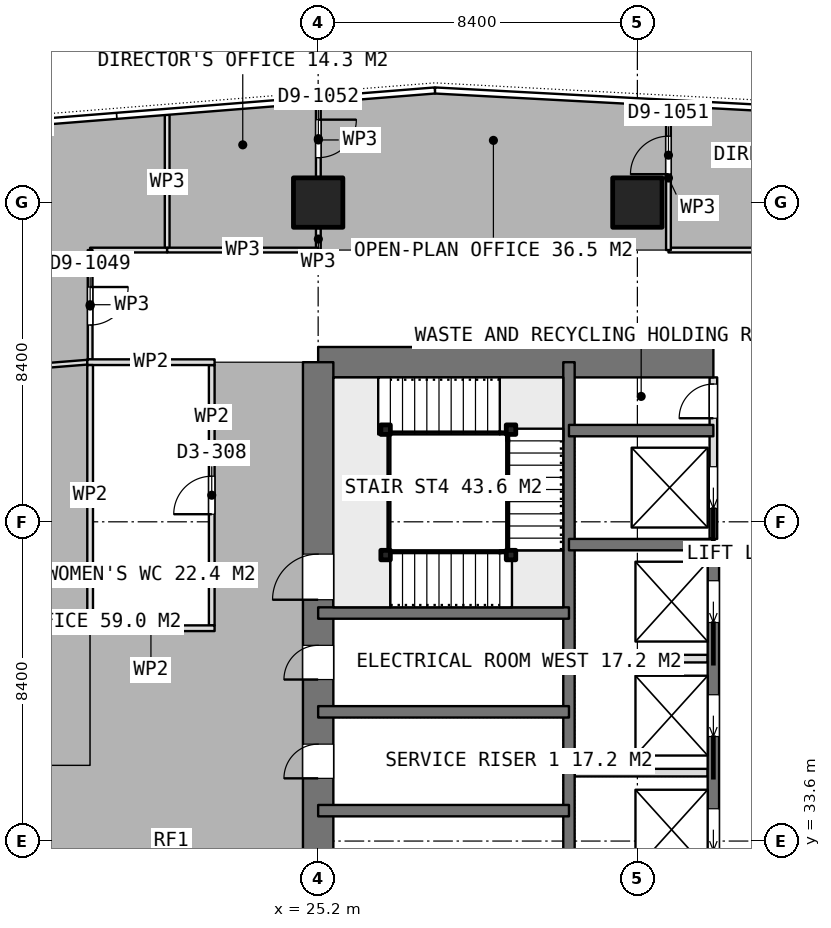
"""IFC4 building model, lengths in metres.
Left out: names, types, materials, properties, quantities, classifications, styles, units other than length and angle.
Written with IfcOpenShell. Run it as: python <this file> out.ifc"""

import sys

from ifc_helpers import new_model, si_unit, direction, frame, frame_2d, origin, origin_2d, place, context, subcontext, project, spatial, rectangle, extrude, element, fill, save


model = new_model("IFC4")
c1 = context("Model", 3, precision=1e-05, world=origin(), true_north=direction((0.0, 1.0)))
c2 = subcontext(c1, "Body", "Model", "MODEL_VIEW")
j1 = project(units=[si_unit("LENGTHUNIT", "METRE"), si_unit("PLANEANGLEUNIT", "RADIAN")], contexts=[c1])
p1 = place(None, origin())
s1 = spatial("IfcSite", under=j1, at=p1, CompositionType="ELEMENT")
p2 = place(p1, origin())
s2 = spatial("IfcBuilding", under=s1, at=p2, CompositionType="ELEMENT")
p3 = place(p2, frame((0.0, 0.0, 283.85)))
s3 = spatial("IfcBuildingStorey", under=s2, at=p3, CompositionType="ELEMENT", Elevation=283.85)
p4 = place(p3, frame((25.2, 46.2, 0.0), z_axis=(0.0, 0.0, 1.0), x_axis=(1.0, 0.0, 0.0)))
e1 = element("IfcWall", 1, at=p4, inside=s3, PredefinedType="SHEAR", context=c2, shape_type="SweptSolid", body=[
    extrude(rectangle(XDim=10.4, YDim=0.8, at=frame_2d((5.2, 0.0))), origin(), (0.0, 0.0, 1.0), 3.75),
])
p5 = place(p3, frame((25.2, 21.0, 0.0), z_axis=(0.0, 0.0, 1.0), x_axis=(0.0, 1.0, 0.0)))
e2 = element("IfcWall", 2, at=p5, inside=s3, PredefinedType="SHEAR", context=c2, shape_type="SweptSolid", body=[
    extrude(rectangle(XDim=25.2, YDim=0.8, at=frame_2d((12.6, 0.0))), origin(), (0.0, 0.0, 1.0), 3.75),
])
p6 = place(p5, frame((7.8, 0.0, 0.0)))
e3 = element("IfcOpeningElement", 3, at=p6, cuts=e2, PredefinedType="OPENING", context=c2, shape_type="SweptSolid", body=[
    extrude(rectangle(XDim=1.2, YDim=2.1, at=frame_2d((0.6, 1.05))), frame((0.0, 0.41, 0.0), z_axis=(0.0, -1.0, 0.0), x_axis=(1.0, 0.0, 0.0)), (0.0, 0.0, 1.0), 0.82),
])
p7 = place(p5, frame((14.25, 0.0, 0.0)))
e4 = element("IfcOpeningElement", 4, at=p7, cuts=e2, PredefinedType="OPENING", context=c2, shape_type="SweptSolid", body=[
    extrude(rectangle(XDim=0.9, YDim=2.1, at=frame_2d((0.45, 1.05))), frame((0.0, 0.41, 0.0), z_axis=(0.0, -1.0, 0.0), x_axis=(1.0, 0.0, 0.0)), (0.0, 0.0, 1.0), 0.82),
])
p8 = place(p5, frame((16.85, 0.0, 0.0)))
e5 = element("IfcOpeningElement", 5, at=p8, cuts=e2, PredefinedType="OPENING", context=c2, shape_type="SweptSolid", body=[
    extrude(rectangle(XDim=0.9, YDim=2.1, at=frame_2d((0.45, 1.05))), frame((0.0, 0.41, 0.0), z_axis=(0.0, -1.0, 0.0), x_axis=(1.0, 0.0, 0.0)), (0.0, 0.0, 1.0), 0.82),
])
p9 = place(p5, frame((18.95, 0.0, 0.0)))
e6 = element("IfcOpeningElement", 6, at=p9, cuts=e2, PredefinedType="OPENING", context=c2, shape_type="SweptSolid", body=[
    extrude(rectangle(XDim=1.2, YDim=2.1, at=frame_2d((0.6, 1.05))), frame((0.0, 0.41, 0.0), z_axis=(0.0, -1.0, 0.0), x_axis=(1.0, 0.0, 0.0)), (0.0, 0.0, 1.0), 0.82),
])
p10 = place(p3, frame((31.8, 21.0, 0.0), z_axis=(0.0, 0.0, 1.0), x_axis=(0.0, 1.0, 0.0)))
e7 = element("IfcWall", 7, at=p10, inside=s3, PredefinedType="SHEAR", context=c2, shape_type="SweptSolid", body=[
    extrude(rectangle(XDim=25.2, YDim=0.3, at=frame_2d((12.6, 0.0))), origin(), (0.0, 0.0, 1.0), 3.75),
])
p11 = place(p3, frame((35.6, 23.4, 0.0), z_axis=(0.0, 0.0, 1.0), x_axis=(0.0, 1.0, 0.0)))
e8 = element("IfcWall", 8, at=p11, inside=s3, PredefinedType="SHEAR", context=c2, shape_type="SweptSolid", body=[
    extrude(rectangle(XDim=18.0, YDim=0.3, at=frame_2d((9.0, 0.0))), origin(), (0.0, 0.0, 1.0), 3.75),
])
p12 = place(p11, frame((0.95, 0.0, 0.0)))
e9 = element("IfcOpeningElement", 9, at=p12, cuts=e8, PredefinedType="OPENING", context=c2, shape_type="SweptSolid", body=[
    extrude(rectangle(XDim=1.1, YDim=2.1, at=frame_2d((0.55, 1.05))), frame((0.0, 0.16, 0.0), z_axis=(0.0, -1.0, 0.0), x_axis=(1.0, 0.0, 0.0)), (0.0, 0.0, 1.0), 0.32),
])
p13 = place(p11, frame((3.95, 0.0, 0.0)))
e10 = element("IfcOpeningElement", 10, at=p13, cuts=e8, PredefinedType="OPENING", context=c2, shape_type="SweptSolid", body=[
    extrude(rectangle(XDim=1.1, YDim=2.1, at=frame_2d((0.55, 1.05))), frame((0.0, 0.16, 0.0), z_axis=(0.0, -1.0, 0.0), x_axis=(1.0, 0.0, 0.0)), (0.0, 0.0, 1.0), 0.32),
])
p14 = place(p11, frame((6.95, 0.0, 0.0)))
e11 = element("IfcOpeningElement", 11, at=p14, cuts=e8, PredefinedType="OPENING", context=c2, shape_type="SweptSolid", body=[
    extrude(rectangle(XDim=1.1, YDim=2.1, at=frame_2d((0.55, 1.05))), frame((0.0, 0.16, 0.0), z_axis=(0.0, -1.0, 0.0), x_axis=(1.0, 0.0, 0.0)), (0.0, 0.0, 1.0), 0.32),
])
p15 = place(p11, frame((9.95, 0.0, 0.0)))
e12 = element("IfcOpeningElement", 12, at=p15, cuts=e8, PredefinedType="OPENING", context=c2, shape_type="SweptSolid", body=[
    extrude(rectangle(XDim=1.1, YDim=2.1, at=frame_2d((0.55, 1.05))), frame((0.0, 0.16, 0.0), z_axis=(0.0, -1.0, 0.0), x_axis=(1.0, 0.0, 0.0)), (0.0, 0.0, 1.0), 0.32),
])
p16 = place(p11, frame((12.95, 0.0, 0.0)))
e13 = element("IfcOpeningElement", 13, at=p16, cuts=e8, PredefinedType="OPENING", context=c2, shape_type="SweptSolid", body=[
    extrude(rectangle(XDim=1.1, YDim=2.1, at=frame_2d((0.55, 1.05))), frame((0.0, 0.16, 0.0), z_axis=(0.0, -1.0, 0.0), x_axis=(1.0, 0.0, 0.0)), (0.0, 0.0, 1.0), 0.32),
])
p17 = place(p11, frame((15.95, 0.0, 0.0)))
e14 = element("IfcOpeningElement", 14, at=p17, cuts=e8, PredefinedType="OPENING", context=c2, shape_type="SweptSolid", body=[
    extrude(rectangle(XDim=1.1, YDim=2.1, at=frame_2d((0.55, 1.05))), frame((0.0, 0.16, 0.0), z_axis=(0.0, -1.0, 0.0), x_axis=(1.0, 0.0, 0.0)), (0.0, 0.0, 1.0), 0.32),
])
for number, where, z_axis, x_axis in (
    (15, (31.8, 41.4, 0.0), (0.0, 0.0, 1.0), (1.0, 0.0, 0.0)),
    (16, (31.8, 44.4, 0.0), (0.0, 0.0, 1.0), (1.0, 0.0, 0.0)),
):
    element("IfcWall", number, at=place(p3, frame(where, z_axis=z_axis, x_axis=x_axis)), inside=s3, PredefinedType="SHEAR", context=c2, shape_type="SweptSolid", body=[
        extrude(rectangle(XDim=3.8, YDim=0.3, at=frame_2d((1.9, 0.0))), origin(), (0.0, 0.0, 1.0), 3.75),
    ])
for number, where, z_axis, x_axis in (
    (17, (25.2, 34.4, 0.0), (0.0, 0.0, 1.0), (1.0, 0.0, 0.0)),
    (18, (25.2, 37.0, 0.0), (0.0, 0.0, 1.0), (1.0, 0.0, 0.0)),
    (19, (25.2, 39.6, 0.0), (0.0, 0.0, 1.0), (1.0, 0.0, 0.0)),
):
    element("IfcWall", number, at=place(p3, frame(where, z_axis=z_axis, x_axis=x_axis)), inside=s3, PredefinedType="SHEAR", context=c2, shape_type="SweptSolid", body=[
        extrude(rectangle(XDim=6.6, YDim=0.3, at=frame_2d((3.3, 0.0))), origin(), (0.0, 0.0, 1.0), 3.75),
    ])
for number, where, z_axis, x_axis in (
    (20, (25.2, 50.4, 0.0), (0.0, 0.0, 1.0), (1.0, 0.0, 0.0)),
    (21, (33.6, 50.4, 0.0), (0.0, 0.0, 1.0), (1.0, 0.0, 0.0)),
):
    element("IfcColumn", number, at=place(p3, frame(where, z_axis=z_axis, x_axis=x_axis)), inside=s3, PredefinedType="COLUMN", context=c2, shape_type="SweptSolid", body=[
        extrude(rectangle(XDim=1.3, YDim=1.3, at=origin_2d()), origin(), (0.0, 0.0, 1.0), 3.75),
    ])
for number, where, z_axis, x_axis in (
    (22, (31.95, 35.4, 0.0), (0.0, 0.0, 1.0), (1.0, 0.0, 0.0)),
    (23, (31.95, 38.4, 0.0), (0.0, 0.0, 1.0), (1.0, 0.0, 0.0)),
):
    element("IfcWall", number, at=place(p3, frame(where, z_axis=z_axis, x_axis=x_axis)), inside=s3, PredefinedType="PARTITIONING", context=c2, shape_type="SweptSolid", body=[
        extrude(rectangle(XDim=3.5, YDim=0.2, at=frame_2d((1.75, 0.0))), origin(), (0.0, 0.0, 1.0), 3.5),
    ])
p18 = place(p3, frame((35.6, 41.55, 0.0), z_axis=(0.0, 0.0, 1.0), x_axis=(0.0, 1.0, 0.0)))
e24 = element("IfcWall", 24, at=p18, inside=s3, PredefinedType="PARTITIONING", context=c2, shape_type="SweptSolid", body=[
    extrude(rectangle(XDim=4.25, YDim=0.2, at=frame_2d((2.125, 0.0))), origin(), (0.0, 0.0, 1.0), 3.5),
])
p19 = place(p18, frame((3.175, 0.0, 0.0)))
e25 = element("IfcOpeningElement", 25, at=p19, cuts=e24, PredefinedType="OPENING", context=c2, shape_type="SweptSolid", body=[
    extrude(rectangle(XDim=0.9, YDim=2.1, at=frame_2d((0.45, 1.05))), frame((0.0, 0.11, 0.0), z_axis=(0.0, -1.0, 0.0), x_axis=(1.0, 0.0, 0.0)), (0.0, 0.0, 1.0), 0.22),
])
p20 = place(p18, frame((0.8, 0.0, 0.0)))
e26 = element("IfcOpeningElement", 26, at=p20, cuts=e24, PredefinedType="OPENING", context=c2, shape_type="SweptSolid", body=[
    extrude(rectangle(XDim=1.1, YDim=2.1, at=frame_2d((0.55, 1.05))), frame((0.0, 0.11, 0.0), z_axis=(0.0, -1.0, 0.0), x_axis=(1.0, 0.0, 0.0)), (0.0, 0.0, 1.0), 0.22),
])
for number, where, z_axis, x_axis in (
    (27, (19.125, 39.2, 0.0), (0.0, 0.0, 1.0), (1.0, 0.0, 0.0)),
    (28, (19.125, 46.2, 0.0), (0.0, 0.0, 1.0), (1.0, 0.0, 0.0)),
):
    element("IfcWall", number, at=place(p3, frame(where, z_axis=z_axis, x_axis=x_axis)), inside=s3, PredefinedType="PARTITIONING", context=c2, shape_type="SweptSolid", body=[
        extrude(rectangle(XDim=3.35, YDim=0.15, at=frame_2d((1.675, 0.0))), origin(), (0.0, 0.0, 1.0), 3.5),
    ])
p21 = place(p3, frame((19.2, 39.275, 0.0), z_axis=(0.0, 0.0, 1.0), x_axis=(0.0, 1.0, 0.0)))
e29 = element("IfcWall", 29, at=p21, inside=s3, PredefinedType="PARTITIONING", context=c2, shape_type="SweptSolid", body=[
    extrude(rectangle(XDim=6.85, YDim=0.15, at=frame_2d((3.425, 0.0))), origin(), (0.0, 0.0, 1.0), 3.5),
])
p22 = place(p3, frame((22.4, 39.275, 0.0), z_axis=(0.0, 0.0, 1.0), x_axis=(0.0, 1.0, 0.0)))
e30 = element("IfcWall", 30, at=p22, inside=s3, PredefinedType="PARTITIONING", context=c2, shape_type="SweptSolid", body=[
    extrude(rectangle(XDim=6.85, YDim=0.15, at=frame_2d((3.425, 0.0))), origin(), (0.0, 0.0, 1.0), 3.5),
])
p23 = place(p22, frame((2.925, 0.0, 0.0)))
e31 = element("IfcOpeningElement", 31, at=p23, cuts=e30, PredefinedType="OPENING", context=c2, shape_type="SweptSolid", body=[
    extrude(rectangle(XDim=1.0, YDim=2.1, at=frame_2d((0.5, 1.05))), frame((0.0, 0.085, 0.0), z_axis=(0.0, -1.0, 0.0), x_axis=(1.0, 0.0, 0.0)), (0.0, 0.0, 1.0), 0.17),
])
p24 = place(p3, frame((42.889, 49.15, 0.0), z_axis=(0.0, 0.0, 1.0), x_axis=(-1.0, 0.0, 0.0)))
e32 = element("IfcWall", 32, at=p24, inside=s3, PredefinedType="PARTITIONING", context=c2, shape_type="SweptSolid", body=[
    extrude(rectangle(XDim=8.471, YDim=0.125, at=frame_2d((4.235, 0.0))), origin(), (0.0, 0.0, 1.0), 3.5),
])
p25 = place(p3, frame((34.418, 49.15, 0.0), z_axis=(0.0, 0.0, 1.0), x_axis=(0.0, 1.0, 0.0)))
e33 = element("IfcWall", 33, at=p25, inside=s3, PredefinedType="PARTITIONING", context=c2, shape_type="SweptSolid", body=[
    extrude(rectangle(XDim=3.793, YDim=0.125, at=frame_2d((1.896, 0.0))), origin(), (0.0, 0.0, 1.0), 3.5),
])
p26 = place(p25, frame((1.997, 0.0, 0.0)))
e34 = element("IfcOpeningElement", 34, at=p26, cuts=e33, PredefinedType="OPENING", context=c2, shape_type="SweptSolid", body=[
    extrude(rectangle(XDim=1.0, YDim=2.1, at=frame_2d((0.5, 1.05))), frame((0.0, 0.073, 0.0), z_axis=(0.0, -1.0, 0.0), x_axis=(1.0, 0.0, 0.0)), (0.0, 0.0, 1.0), 0.145),
])
p27 = place(p3, frame((25.205, 53.025, 0.0), z_axis=(0.0, 0.0, 1.0), x_axis=(0.0, -1.0, 0.0)))
e35 = element("IfcWall", 35, at=p27, inside=s3, PredefinedType="PARTITIONING", context=c2, shape_type="SweptSolid", body=[
    extrude(rectangle(XDim=1.955, YDim=0.125, at=frame_2d((0.978, 0.0))), origin(), (0.0, 0.0, 1.0), 3.5),
])
p28 = place(p27, frame((0.443, 0.0, 0.0)))
e36 = element("IfcOpeningElement", 36, at=p28, cuts=e35, PredefinedType="OPENING", context=c2, shape_type="SweptSolid", body=[
    extrude(rectangle(XDim=1.0, YDim=2.1, at=frame_2d((0.5, 1.05))), frame((0.0, 0.073, 0.0), z_axis=(0.0, -1.0, 0.0), x_axis=(1.0, 0.0, 0.0)), (0.0, 0.0, 1.0), 0.145),
])
p29 = place(p3, frame((25.205, 49.73, 0.0), z_axis=(0.0, 0.0, 1.0), x_axis=(0.0, -1.0, 0.0)))
e37 = element("IfcWall", 37, at=p29, inside=s3, PredefinedType="PARTITIONING", context=c2, shape_type="SweptSolid", body=[
    extrude(rectangle(XDim=0.58, YDim=0.125, at=frame_2d((0.29, 0.0))), origin(), (0.0, 0.0, 1.0), 3.5),
])
p30 = place(p3, frame((25.205, 49.15, 0.0), z_axis=(0.0, 0.0, 1.0), x_axis=(-1.0, 0.0, 0.0)))
e38 = element("IfcWall", 38, at=p30, inside=s3, PredefinedType="PARTITIONING", context=c2, shape_type="SweptSolid", body=[
    extrude(rectangle(XDim=3.978, YDim=0.125, at=frame_2d((1.989, 0.0))), origin(), (0.0, 0.0, 1.0), 3.5),
])
p31 = place(p3, frame((21.227, 49.15, 0.0), z_axis=(0.0, 0.0, 1.0), x_axis=(0.0, 1.0, 0.0)))
e39 = element("IfcWall", 39, at=p31, inside=s3, PredefinedType="PARTITIONING", context=c2, shape_type="SweptSolid", body=[
    extrude(rectangle(XDim=3.558, YDim=0.125, at=frame_2d((1.779, 0.0))), origin(), (0.0, 0.0, 1.0), 3.5),
])
p32 = place(p3, frame((19.125, 46.2, 0.0), z_axis=(0.0, 0.0, 1.0), x_axis=(-0.996825420684, -0.079618343858, 0.0)))
e40 = element("IfcWall", 40, at=p32, inside=s3, PredefinedType="PARTITIONING", context=c2, shape_type="SweptSolid", body=[
    extrude(rectangle(XDim=5.201, YDim=0.125, at=frame_2d((2.6, 0.0))), origin(), (0.0, 0.0, 1.0), 3.5),
])
p33 = place(p3, frame((21.226, 49.15, 0.0), z_axis=(0.0, 0.0, 1.0), x_axis=(-1.0, 0.0, 0.0)))
e41 = element("IfcWall", 41, at=p33, inside=s3, PredefinedType="PARTITIONING", context=c2, shape_type="SweptSolid", body=[
    extrude(rectangle(XDim=2.026, YDim=0.125, at=frame_2d((1.013, 0.0))), origin(), (0.0, 0.0, 1.0), 3.5),
])
p34 = place(p3, frame((19.2, 49.15, 0.0), z_axis=(0.0, 0.0, 1.0), x_axis=(0.0, -1.0, 0.0)))
e42 = element("IfcWall", 42, at=p34, inside=s3, PredefinedType="PARTITIONING", context=c2, shape_type="SweptSolid", body=[
    extrude(rectangle(XDim=2.875, YDim=0.125, at=frame_2d((1.438, 0.0))), origin(), (0.0, 0.0, 1.0), 3.5),
])
p35 = place(p34, frame((0.972, 0.0, 0.0)))
e43 = element("IfcOpeningElement", 43, at=p35, cuts=e42, PredefinedType="OPENING", context=c2, shape_type="SweptSolid", body=[
    extrude(rectangle(XDim=1.0, YDim=2.1, at=frame_2d((0.5, 1.05))), frame((0.0, 0.073, 0.0), z_axis=(0.0, -1.0, 0.0), x_axis=(1.0, 0.0, 0.0)), (0.0, 0.0, 1.0), 0.145),
])
for number, where, z_axis, x_axis in (
    (44, (26.975, 41.125, 0.0), (0.0, 0.0, 1.0), (1.0, 0.0, 0.0)),
    (45, (30.275, 41.125, 0.0), (0.0, 0.0, 1.0), (1.0, 0.0, 0.0)),
    (46, (30.275, 44.425, 0.0), (0.0, 0.0, 1.0), (1.0, 0.0, 0.0)),
    (47, (26.975, 44.425, 0.0), (0.0, 0.0, 1.0), (1.0, 0.0, 0.0)),
):
    element("IfcColumn", number, at=place(p3, frame(where, z_axis=z_axis, x_axis=x_axis)), inside=s3, PredefinedType="COLUMN", context=c2, shape_type="SweptSolid", body=[
        extrude(rectangle(XDim=0.25, YDim=0.25, at=origin_2d()), origin(), (0.0, 0.0, 1.0), 3.75),
    ])
p36 = place(p7, origin())
e48 = element("IfcDoor", 48, at=p36, inside=s3, OperationType="SINGLE_SWING_LEFT", PredefinedType="DOOR", context=c2, shape_type="SweptSolid", body=[
    extrude(rectangle(XDim=0.9, YDim=2.1, at=frame_2d((0.45, 1.05))), frame((0.0, 0.025, 0.0), z_axis=(0.0, -1.0, 0.0), x_axis=(1.0, 0.0, 0.0)), (0.0, 0.0, 1.0), 0.05),
])
fill(e4, e48)
p37 = place(p8, origin())
e49 = element("IfcDoor", 49, at=p37, inside=s3, OperationType="SINGLE_SWING_LEFT", PredefinedType="DOOR", context=c2, shape_type="SweptSolid", body=[
    extrude(rectangle(XDim=0.9, YDim=2.1, at=frame_2d((0.45, 1.05))), frame((0.0, 0.025, 0.0), z_axis=(0.0, -1.0, 0.0), x_axis=(1.0, 0.0, 0.0)), (0.0, 0.0, 1.0), 0.05),
])
fill(e5, e49)
p38 = place(p19, origin())
e50 = element("IfcDoor", 50, at=p38, inside=s3, OperationType="SINGLE_SWING_LEFT", PredefinedType="DOOR", context=c2, shape_type="SweptSolid", body=[
    extrude(rectangle(XDim=0.9, YDim=2.1, at=frame_2d((0.45, 1.05))), frame((0.0, 0.025, 0.0), z_axis=(0.0, -1.0, 0.0), x_axis=(1.0, 0.0, 0.0)), (0.0, 0.0, 1.0), 0.05),
])
fill(e25, e50)
p39 = place(p15, origin())
e51 = element("IfcDoor", 51, at=p39, inside=s3, OperationType="SLIDING_TO_LEFT", PredefinedType="USERDEFINED", context=c2, shape_type="SweptSolid", body=[
    extrude(rectangle(XDim=1.1, YDim=2.1, at=frame_2d((0.55, 1.05))), frame((0.0, 0.025, 0.0), z_axis=(0.0, -1.0, 0.0), x_axis=(1.0, 0.0, 0.0)), (0.0, 0.0, 1.0), 0.05),
])
fill(e12, e51)
p40 = place(p16, origin())
e52 = element("IfcDoor", 52, at=p40, inside=s3, OperationType="SLIDING_TO_LEFT", PredefinedType="USERDEFINED", context=c2, shape_type="SweptSolid", body=[
    extrude(rectangle(XDim=1.1, YDim=2.1, at=frame_2d((0.55, 1.05))), frame((0.0, 0.025, 0.0), z_axis=(0.0, -1.0, 0.0), x_axis=(1.0, 0.0, 0.0)), (0.0, 0.0, 1.0), 0.05),
])
fill(e13, e52)
p41 = place(p17, origin())
e53 = element("IfcDoor", 53, at=p41, inside=s3, OperationType="SLIDING_TO_LEFT", PredefinedType="USERDEFINED", context=c2, shape_type="SweptSolid", body=[
    extrude(rectangle(XDim=1.1, YDim=2.1, at=frame_2d((0.55, 1.05))), frame((0.0, 0.025, 0.0), z_axis=(0.0, -1.0, 0.0), x_axis=(1.0, 0.0, 0.0)), (0.0, 0.0, 1.0), 0.05),
])
fill(e14, e53)
p42 = place(p20, origin())
e54 = element("IfcDoor", 54, at=p42, inside=s3, OperationType="SLIDING_TO_LEFT", PredefinedType="USERDEFINED", context=c2, shape_type="SweptSolid", body=[
    extrude(rectangle(XDim=1.1, YDim=2.1, at=frame_2d((0.55, 1.05))), frame((0.0, 0.025, 0.0), z_axis=(0.0, -1.0, 0.0), x_axis=(1.0, 0.0, 0.0)), (0.0, 0.0, 1.0), 0.05),
])
fill(e26, e54)
p43 = place(p23, origin())
e55 = element("IfcDoor", 55, at=p43, inside=s3, OperationType="SINGLE_SWING_LEFT", PredefinedType="DOOR", context=c2, shape_type="SweptSolid", body=[
    extrude(rectangle(XDim=1.0, YDim=2.1, at=frame_2d((0.5, 1.05))), frame((0.0, 0.025, 0.0), z_axis=(0.0, -1.0, 0.0), x_axis=(1.0, 0.0, 0.0)), (0.0, 0.0, 1.0), 0.05),
])
fill(e31, e55)
p44 = place(p26, origin())
e56 = element("IfcDoor", 56, at=p44, inside=s3, OperationType="SINGLE_SWING_LEFT", PredefinedType="DOOR", context=c2, shape_type="SweptSolid", body=[
    extrude(rectangle(XDim=1.0, YDim=2.1, at=frame_2d((0.5, 1.05))), frame((0.0, 0.025, 0.0), z_axis=(0.0, -1.0, 0.0), x_axis=(1.0, 0.0, 0.0)), (0.0, 0.0, 1.0), 0.05),
])
fill(e34, e56)
p45 = place(p28, origin())
e57 = element("IfcDoor", 57, at=p45, inside=s3, OperationType="SINGLE_SWING_LEFT", PredefinedType="DOOR", context=c2, shape_type="SweptSolid", body=[
    extrude(rectangle(XDim=1.0, YDim=2.1, at=frame_2d((0.5, 1.05))), frame((0.0, 0.025, 0.0), z_axis=(0.0, -1.0, 0.0), x_axis=(1.0, 0.0, 0.0)), (0.0, 0.0, 1.0), 0.05),
])
fill(e36, e57)
p46 = place(p35, origin())
e58 = element("IfcDoor", 58, at=p46, inside=s3, OperationType="SINGLE_SWING_LEFT", PredefinedType="DOOR", context=c2, shape_type="SweptSolid", body=[
    extrude(rectangle(XDim=1.0, YDim=2.1, at=frame_2d((0.5, 1.05))), frame((0.0, 0.025, 0.0), z_axis=(0.0, -1.0, 0.0), x_axis=(1.0, 0.0, 0.0)), (0.0, 0.0, 1.0), 0.05),
])
fill(e43, e58)
p47 = place(p9, origin())
e59 = element("IfcDoor", 59, at=p47, inside=s3, OperationType="SINGLE_SWING_RIGHT", PredefinedType="DOOR", context=c2, shape_type="SweptSolid", body=[
    extrude(rectangle(XDim=1.2, YDim=2.1, at=frame_2d((0.6, 1.05))), frame((0.0, 0.025, 0.0), z_axis=(0.0, -1.0, 0.0), x_axis=(1.0, 0.0, 0.0)), (0.0, 0.0, 1.0), 0.05),
])
fill(e6, e59)
save(model, sys.argv[1])
